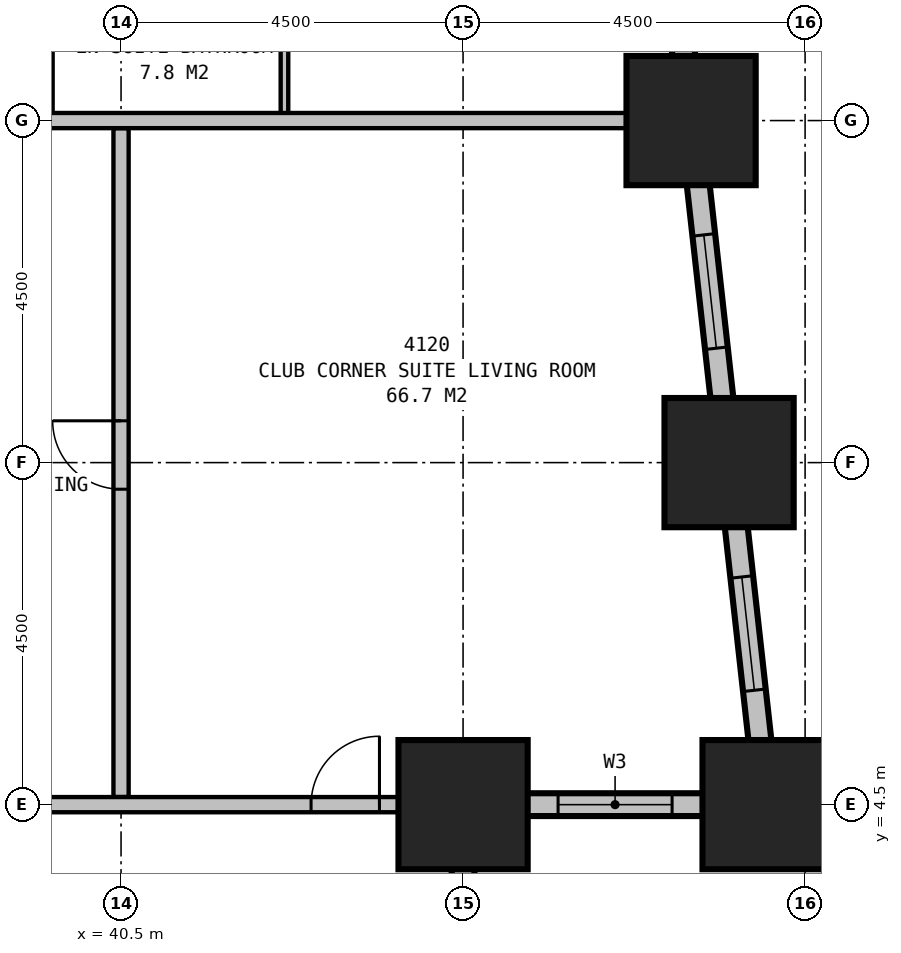
"""IFC4 building model, lengths in metres.
Left out: names, types, materials, properties, quantities, classifications, styles, units other than length and angle.
Written with IfcOpenShell. Run it as: python <this file> out.ifc"""

import sys

from ifc_helpers import new_model, si_unit, direction, frame, frame_2d, origin, origin_2d, place, context, subcontext, project, spatial, rectangle, extrude, element, fill, save


model = new_model("IFC4")
c1 = context("Model", 3, precision=1e-05, world=origin(), true_north=direction((0.0, 1.0)))
c2 = subcontext(c1, "Body", "Model", "MODEL_VIEW")
j1 = project(units=[si_unit("LENGTHUNIT", "METRE"), si_unit("PLANEANGLEUNIT", "RADIAN")], contexts=[c1])
p1 = place(None, origin())
s1 = spatial("IfcSite", under=j1, at=p1, CompositionType="ELEMENT")
p2 = place(p1, origin())
s2 = spatial("IfcBuilding", under=s1, at=p2, CompositionType="ELEMENT")
p3 = place(p2, frame((0.0, 0.0, 162.4)))
s3 = spatial("IfcBuildingStorey", under=s2, at=p3, CompositionType="ELEMENT", Elevation=162.4)
for number, where, z_axis, x_axis in (
    (1, (45.0, 4.5, 0.0), (0.0, 0.0, 1.0), (1.0, 0.0, 0.0)),
    (2, (49.0, 4.5, 0.0), (0.0, 0.0, 1.0), (1.0, 0.0, 0.0)),
    (3, (48.5, 9.0, 0.0), (0.0, 0.0, 1.0), (1.0, 0.0, 0.0)),
    (4, (48.0, 13.5, 0.0), (0.0, 0.0, 1.0), (1.0, 0.0, 0.0)),
):
    element("IfcColumn", number, at=place(p3, frame(where, z_axis=z_axis, x_axis=x_axis)), inside=s3, PredefinedType="COLUMN", context=c2, shape_type="SweptSolid", body=[
        extrude(rectangle(XDim=1.7, YDim=1.7, at=origin_2d()), origin(), (0.0, 0.0, 1.0), 3.5),
    ])
p4 = place(p3, frame((45.0, -0.15, 0.0), z_axis=(0.0, 0.0, 1.0), x_axis=(0.0, 1.0, 0.0)))
e5 = element("IfcWall", 5, at=p4, inside=s3, PredefinedType="STANDARD", context=c2, shape_type="SweptSolid", body=[
    extrude(rectangle(XDim=4.8, YDim=0.3, at=frame_2d((2.4, 0.0))), origin(), (0.0, 0.0, 1.0), 2.25),
])
p5 = place(p4, frame((1.2, 0.0, 0.5)))
e6 = element("IfcOpeningElement", 6, at=p5, cuts=e5, PredefinedType="OPENING", context=c2, shape_type="SweptSolid", body=[
    extrude(rectangle(XDim=2.4, YDim=1.6, at=frame_2d((1.2, 0.8))), frame((0.0, 0.16, 0.0), z_axis=(0.0, -1.0, 0.0), x_axis=(1.0, 0.0, 0.0)), (0.0, 0.0, 1.0), 0.32),
])
p6 = place(p3, frame((44.85, 4.5, 0.0), z_axis=(0.0, 0.0, 1.0), x_axis=(1.0, 0.0, 0.0)))
e7 = element("IfcWall", 7, at=p6, inside=s3, PredefinedType="STANDARD", context=c2, shape_type="SweptSolid", body=[
    extrude(rectangle(XDim=4.3, YDim=0.3, at=frame_2d((2.15, 0.0))), origin(), (0.0, 0.0, 1.0), 2.25),
])
p7 = place(p6, frame((1.4, 0.0, 0.5)))
e8 = element("IfcOpeningElement", 8, at=p7, cuts=e7, PredefinedType="OPENING", context=c2, shape_type="SweptSolid", body=[
    extrude(rectangle(XDim=1.5, YDim=1.6, at=frame_2d((0.75, 0.8))), frame((0.0, 0.16, 0.0), z_axis=(0.0, -1.0, 0.0), x_axis=(1.0, 0.0, 0.0)), (0.0, 0.0, 1.0), 0.32),
])
p8 = place(p3, frame((49.017, 4.351, 0.0), z_axis=(0.0, 0.0, 1.0), x_axis=(-0.110433201132, 0.993883548555, 0.0)))
e9 = element("IfcWall", 9, at=p8, inside=s3, PredefinedType="STANDARD", context=c2, shape_type="SweptSolid", body=[
    extrude(rectangle(XDim=31.994, YDim=0.3, at=frame_2d((15.997, 0.0))), origin(), (0.0, 0.0, 1.0), 2.25),
])
p9 = place(p8, frame((1.664, 0.0, 0.5)))
e10 = element("IfcOpeningElement", 10, at=p9, cuts=e9, PredefinedType="OPENING", context=c2, shape_type="SweptSolid", body=[
    extrude(rectangle(XDim=1.5, YDim=1.6, at=frame_2d((0.75, 0.8))), frame((0.0, 0.16, 0.0), z_axis=(0.0, -1.0, 0.0), x_axis=(1.0, 0.0, 0.0)), (0.0, 0.0, 1.0), 0.32),
])
p10 = place(p8, frame((6.192, 0.0, 0.5)))
e11 = element("IfcOpeningElement", 11, at=p10, cuts=e9, PredefinedType="OPENING", context=c2, shape_type="SweptSolid", body=[
    extrude(rectangle(XDim=1.5, YDim=1.6, at=frame_2d((0.75, 0.8))), frame((0.0, 0.16, 0.0), z_axis=(0.0, -1.0, 0.0), x_axis=(1.0, 0.0, 0.0)), (0.0, 0.0, 1.0), 0.32),
])
p11 = place(p8, frame((10.719, 0.0, 0.5)))
e12 = element("IfcOpeningElement", 12, at=p11, cuts=e9, PredefinedType="OPENING", context=c2, shape_type="SweptSolid", body=[
    extrude(rectangle(XDim=1.5, YDim=1.6, at=frame_2d((0.75, 0.8))), frame((0.0, 0.16, 0.0), z_axis=(0.0, -1.0, 0.0), x_axis=(1.0, 0.0, 0.0)), (0.0, 0.0, 1.0), 0.32),
])
p12 = place(p8, frame((15.247, 0.0, 0.5)))
e13 = element("IfcOpeningElement", 13, at=p12, cuts=e9, PredefinedType="OPENING", context=c2, shape_type="SweptSolid", body=[
    extrude(rectangle(XDim=1.5, YDim=1.6, at=frame_2d((0.75, 0.8))), frame((0.0, 0.16, 0.0), z_axis=(0.0, -1.0, 0.0), x_axis=(1.0, 0.0, 0.0)), (0.0, 0.0, 1.0), 0.32),
])
p13 = place(p8, frame((19.775, 0.0, 0.5)))
e14 = element("IfcOpeningElement", 14, at=p13, cuts=e9, PredefinedType="OPENING", context=c2, shape_type="SweptSolid", body=[
    extrude(rectangle(XDim=1.5, YDim=1.6, at=frame_2d((0.75, 0.8))), frame((0.0, 0.16, 0.0), z_axis=(0.0, -1.0, 0.0), x_axis=(1.0, 0.0, 0.0)), (0.0, 0.0, 1.0), 0.32),
])
p14 = place(p8, frame((24.302, 0.0, 0.5)))
e15 = element("IfcOpeningElement", 15, at=p14, cuts=e9, PredefinedType="OPENING", context=c2, shape_type="SweptSolid", body=[
    extrude(rectangle(XDim=1.5, YDim=1.6, at=frame_2d((0.75, 0.8))), frame((0.0, 0.16, 0.0), z_axis=(0.0, -1.0, 0.0), x_axis=(1.0, 0.0, 0.0)), (0.0, 0.0, 1.0), 0.32),
])
p15 = place(p8, frame((28.83, 0.0, 0.5)))
e16 = element("IfcOpeningElement", 16, at=p15, cuts=e9, PredefinedType="OPENING", context=c2, shape_type="SweptSolid", body=[
    extrude(rectangle(XDim=1.5, YDim=1.6, at=frame_2d((0.75, 0.8))), frame((0.0, 0.16, 0.0), z_axis=(0.0, -1.0, 0.0), x_axis=(1.0, 0.0, 0.0)), (0.0, 0.0, 1.0), 0.32),
])
p16 = place(p3, frame((42.65, 13.5, 0.0), z_axis=(0.0, 0.0, 1.0), x_axis=(0.0, 1.0, 0.0)))
e17 = element("IfcWall", 17, at=p16, inside=s3, PredefinedType="PLUMBINGWALL", context=c2, shape_type="SweptSolid", body=[
    extrude(rectangle(XDim=2.8, YDim=0.1, at=frame_2d((1.4, 0.0))), origin(), (0.0, 0.0, 1.0), 3.25),
])
p17 = place(p3, frame((38.3, 13.5, 0.0), z_axis=(0.0, 0.0, 1.0), x_axis=(1.0, 0.0, 0.0)))
e18 = element("IfcWall", 18, at=p17, inside=s3, PredefinedType="PARTITIONING", context=c2, shape_type="SweptSolid", body=[
    extrude(rectangle(XDim=9.921, YDim=0.2, at=frame_2d((4.96, 0.0))), origin(), (0.0, 0.0, 1.0), 1.95),
])
p18 = place(p3, frame((35.9, 4.5, 0.0), z_axis=(0.0, 0.0, 1.0), x_axis=(1.0, 0.0, 0.0)))
e19 = element("IfcWall", 19, at=p18, inside=s3, PredefinedType="PARTITIONING", context=c2, shape_type="SweptSolid", body=[
    extrude(rectangle(XDim=9.1, YDim=0.2, at=frame_2d((4.55, 0.0))), origin(), (0.0, 0.0, 1.0), 3.25),
])
p19 = place(p18, frame((7.1, 0.0, 0.0)))
e20 = element("IfcOpeningElement", 20, at=p19, cuts=e19, PredefinedType="OPENING", context=c2, shape_type="SweptSolid", body=[
    extrude(rectangle(XDim=0.9, YDim=2.1, at=frame_2d((0.45, 1.05))), frame((0.0, 0.11, 0.0), z_axis=(0.0, -1.0, 0.0), x_axis=(1.0, 0.0, 0.0)), (0.0, 0.0, 1.0), 0.22),
])
p20 = place(p3, frame((40.5, 4.6, 0.0), z_axis=(0.0, 0.0, 1.0), x_axis=(0.0, 1.0, 0.0)))
e21 = element("IfcWall", 21, at=p20, inside=s3, PredefinedType="PARTITIONING", context=c2, shape_type="SweptSolid", body=[
    extrude(rectangle(XDim=8.8, YDim=0.2, at=frame_2d((4.4, 0.0))), origin(), (0.0, 0.0, 1.0), 2.25),
])
p21 = place(p20, frame((4.05, 0.0, 0.0)))
e22 = element("IfcOpeningElement", 22, at=p21, cuts=e21, PredefinedType="OPENING", context=c2, shape_type="SweptSolid", body=[
    extrude(rectangle(XDim=0.9, YDim=2.1, at=frame_2d((0.45, 1.05))), frame((0.0, 0.11, 0.0), z_axis=(0.0, -1.0, 0.0), x_axis=(1.0, 0.0, 0.0)), (0.0, 0.0, 1.0), 0.22),
])
p22 = place(p7, origin())
e23 = element("IfcWindow", 23, at=p22, inside=s3, PartitioningType="SINGLE_PANEL", PredefinedType="WINDOW", context=c2, shape_type="SweptSolid", body=[
    extrude(rectangle(XDim=1.5, YDim=1.6, at=frame_2d((0.75, 0.8))), frame((0.0, 0.03, 0.0), z_axis=(0.0, -1.0, 0.0), x_axis=(1.0, 0.0, 0.0)), (0.0, 0.0, 1.0), 0.06),
])
fill(e8, e23)
p23 = place(p9, origin())
e24 = element("IfcWindow", 24, at=p23, inside=s3, PartitioningType="SINGLE_PANEL", PredefinedType="WINDOW", context=c2, shape_type="SweptSolid", body=[
    extrude(rectangle(XDim=1.5, YDim=1.6, at=frame_2d((0.75, 0.8))), frame((0.0, 0.03, 0.0), z_axis=(0.0, -1.0, 0.0), x_axis=(1.0, 0.0, 0.0)), (0.0, 0.0, 1.0), 0.06),
])
fill(e10, e24)
p24 = place(p10, origin())
e25 = element("IfcWindow", 25, at=p24, inside=s3, PartitioningType="SINGLE_PANEL", PredefinedType="WINDOW", context=c2, shape_type="SweptSolid", body=[
    extrude(rectangle(XDim=1.5, YDim=1.6, at=frame_2d((0.75, 0.8))), frame((0.0, 0.03, 0.0), z_axis=(0.0, -1.0, 0.0), x_axis=(1.0, 0.0, 0.0)), (0.0, 0.0, 1.0), 0.06),
])
fill(e11, e25)
p25 = place(p19, origin())
e26 = element("IfcDoor", 26, at=p25, inside=s3, OperationType="SINGLE_SWING_RIGHT", PredefinedType="DOOR", context=c2, shape_type="SweptSolid", body=[
    extrude(rectangle(XDim=0.9, YDim=2.1, at=frame_2d((0.45, 1.05))), frame((0.0, 0.025, 0.0), z_axis=(0.0, -1.0, 0.0), x_axis=(1.0, 0.0, 0.0)), (0.0, 0.0, 1.0), 0.05),
])
fill(e20, e26)
p26 = place(p21, origin())
e27 = element("IfcDoor", 27, at=p26, inside=s3, OperationType="SINGLE_SWING_RIGHT", PredefinedType="DOOR", context=c2, shape_type="SweptSolid", body=[
    extrude(rectangle(XDim=0.9, YDim=2.1, at=frame_2d((0.45, 1.05))), frame((0.0, 0.025, 0.0), z_axis=(0.0, -1.0, 0.0), x_axis=(1.0, 0.0, 0.0)), (0.0, 0.0, 1.0), 0.05),
])
fill(e22, e27)
save(model, sys.argv[1])
